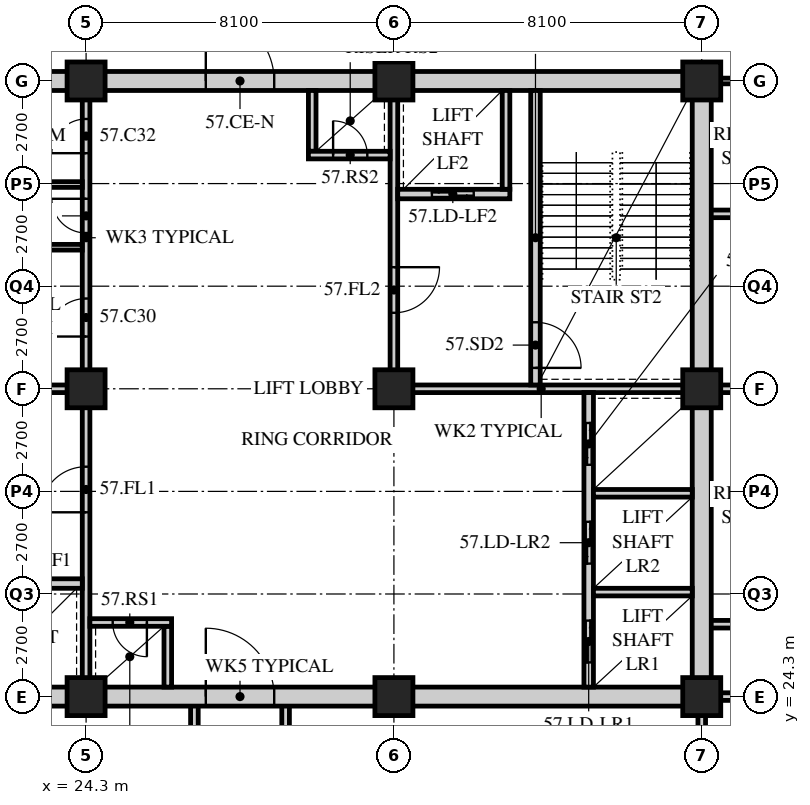
"""IFC4 building model, lengths in metres.
Left out: names, types, materials, properties, quantities, classifications, styles, units other than length and angle.
Written with IfcOpenShell. Run it as: python <this file> out.ifc"""

import sys

from ifc_helpers import new_model, si_unit, direction, frame, frame_2d, origin, origin_2d, place, context, subcontext, project, spatial, rectangle, hollow_rectangle, extrude, element, fill, save


model = new_model("IFC4")
c1 = context("Model", 3, precision=1e-05, world=origin(), true_north=direction((0.0, 1.0)))
c2 = subcontext(c1, "Body", "Model", "MODEL_VIEW")
j1 = project(units=[si_unit("LENGTHUNIT", "METRE"), si_unit("PLANEANGLEUNIT", "RADIAN")], contexts=[c1])
p1 = place(None, origin())
s1 = spatial("IfcSite", under=j1, at=p1, CompositionType="ELEMENT")
p2 = place(p1, origin())
s2 = spatial("IfcBuilding", under=s1, at=p2, CompositionType="ELEMENT")
p3 = place(p2, frame((0.0, 0.0, 220.8)))
s3 = spatial("IfcBuildingStorey", under=s2, at=p3, CompositionType="ELEMENT", Elevation=220.8)
for number, where, z_axis, x_axis in (
    (1, (24.3, 24.3, 0.0), (0.0, 0.0, 1.0), (1.0, 0.0, 0.0)),
    (2, (24.3, 32.4, 0.0), (0.0, 0.0, 1.0), (1.0, 0.0, 0.0)),
    (3, (24.3, 40.5, 0.0), (0.0, 0.0, 1.0), (1.0, 0.0, 0.0)),
    (4, (32.4, 24.3, 0.0), (0.0, 0.0, 1.0), (1.0, 0.0, 0.0)),
    (5, (32.4, 32.4, 0.0), (0.0, 0.0, 1.0), (1.0, 0.0, 0.0)),
    (6, (32.4, 40.5, 0.0), (0.0, 0.0, 1.0), (1.0, 0.0, 0.0)),
    (7, (40.5, 24.3, 0.0), (0.0, 0.0, 1.0), (1.0, 0.0, 0.0)),
    (8, (40.5, 32.4, 0.0), (0.0, 0.0, 1.0), (1.0, 0.0, 0.0)),
    (9, (40.5, 40.5, 0.0), (0.0, 0.0, 1.0), (1.0, 0.0, 0.0)),
):
    element("IfcColumn", number, at=place(p3, frame(where, z_axis=z_axis, x_axis=x_axis)), inside=s3, PredefinedType="COLUMN", context=c2, shape_type="SweptSolid", body=[
        extrude(hollow_rectangle(XDim=1.0, YDim=1.0, WallThickness=0.1, at=origin_2d()), origin(), (0.0, 0.0, 1.0), 3.6),
    ])
p4 = place(p3, frame((46.8, 40.5, 0.0), z_axis=(0.0, 0.0, 1.0), x_axis=(-1.0, 0.0, 0.0)))
e10 = element("IfcWall", 10, at=p4, inside=s3, PredefinedType="PARTITIONING", context=c2, shape_type="SweptSolid", body=[
    extrude(rectangle(XDim=6.1, YDim=0.15, at=frame_2d((3.05, 0.0))), origin(), (0.0, 0.0, 1.0), 3.39),
])
for number, where, z_axis, x_axis in (
    (11, (40.5, 32.4, 0.0), (0.0, 0.0, 1.0), (1.0, 0.0, 0.0)),
    (12, (46.8, 26.205, 0.0), (0.0, 0.0, 1.0), (-1.0, 0.0, 0.0)),
    (13, (46.8, 37.003, 0.0), (0.0, 0.0, 1.0), (-1.0, 0.0, 0.0)),
):
    element("IfcWall", number, at=place(p3, frame(where, z_axis=z_axis, x_axis=x_axis)), inside=s3, PredefinedType="SOLIDWALL", context=c2, shape_type="SweptSolid", body=[
        extrude(rectangle(XDim=6.3, YDim=0.2, at=frame_2d((3.15, 0.0))), origin(), (0.0, 0.0, 1.0), 3.39),
    ])
p5 = place(p3, frame((40.5, 20.7, 0.0), z_axis=(0.0, 0.0, 1.0), x_axis=(0.0, 1.0, 0.0)))
e14 = element("IfcWall", 14, at=p5, inside=s3, PredefinedType="SOLIDWALL", context=c2, shape_type="SweptSolid", body=[
    extrude(rectangle(XDim=3.6, YDim=0.2, at=frame_2d((1.8, 0.0))), origin(), (0.0, 0.0, 1.0), 2.628),
])
for number, where, z_axis, x_axis in (
    (15, (27.15, 20.7, 0.0), (0.0, 0.0, 1.0), (0.0, 1.0, 0.0)),
    (16, (29.55, 20.7, 0.0), (0.0, 0.0, 1.0), (0.0, 1.0, 0.0)),
):
    element("IfcWall", number, at=place(p3, frame(where, z_axis=z_axis, x_axis=x_axis)), inside=s3, PredefinedType="SOLIDWALL", context=c2, shape_type="SweptSolid", body=[
        extrude(rectangle(XDim=3.6, YDim=0.2, at=frame_2d((1.8, 0.0))), origin(), (0.0, 0.0, 1.0), 3.39),
    ])
p6 = place(p3, frame((40.5, 24.3, 0.0), z_axis=(0.0, 0.0, 1.0), x_axis=(1.0, 0.0, 0.0)))
e17 = element("IfcWall", 17, at=p6, inside=s3, PredefinedType="SOLIDWALL", context=c2, shape_type="SweptSolid", body=[
    extrude(rectangle(XDim=6.3, YDim=0.2, at=frame_2d((3.15, 0.0))), origin(), (0.0, 0.0, 1.0), 3.39),
])
p7 = place(p3, frame((15.95, 24.3, 0.0), z_axis=(0.0, 0.0, 1.0), x_axis=(1.0, 0.0, 0.0)))
e18 = element("IfcWall", 18, at=p7, inside=s3, PredefinedType="SOLIDWALL", context=c2, shape_type="SweptSolid", body=[
    extrude(rectangle(XDim=24.8, YDim=0.5, at=frame_2d((12.4, 0.0))), origin(), (0.0, 0.0, 1.0), 2.628),
])
p8 = place(p7, frame((11.5, 0.0, 0.0)))
e19 = element("IfcOpeningElement", 19, at=p8, cuts=e18, PredefinedType="OPENING", context=c2, shape_type="SweptSolid", body=[
    extrude(rectangle(XDim=1.8, YDim=2.4, at=frame_2d((0.9, 1.2))), frame((0.0, 0.26, 0.0), z_axis=(0.0, -1.0, 0.0), x_axis=(1.0, 0.0, 0.0)), (0.0, 0.0, 1.0), 0.52),
])
p9 = place(p3, frame((15.95, 40.5, 0.0), z_axis=(0.0, 0.0, 1.0), x_axis=(1.0, 0.0, 0.0)))
e20 = element("IfcWall", 20, at=p9, inside=s3, PredefinedType="SOLIDWALL", context=c2, shape_type="SweptSolid", body=[
    extrude(rectangle(XDim=24.8, YDim=0.5, at=frame_2d((12.4, 0.0))), origin(), (0.0, 0.0, 1.0), 2.628),
])
p10 = place(p9, frame((11.5, 0.0, 0.0)))
e21 = element("IfcOpeningElement", 21, at=p10, cuts=e20, PredefinedType="OPENING", context=c2, shape_type="SweptSolid", body=[
    extrude(rectangle(XDim=1.8, YDim=2.4, at=frame_2d((0.9, 1.2))), frame((0.0, 0.26, 0.0), z_axis=(0.0, -1.0, 0.0), x_axis=(1.0, 0.0, 0.0)), (0.0, 0.0, 1.0), 0.52),
])
p11 = place(p3, frame((40.5, 24.55, 0.0), z_axis=(0.0, 0.0, 1.0), x_axis=(0.0, 1.0, 0.0)))
e22 = element("IfcWall", 22, at=p11, inside=s3, PredefinedType="SOLIDWALL", context=c2, shape_type="SweptSolid", body=[
    extrude(rectangle(XDim=15.7, YDim=0.5, at=frame_2d((7.85, 0.0))), origin(), (0.0, 0.0, 1.0), 2.628),
])
p12 = place(p3, frame((16.45, 32.4, 0.0), z_axis=(0.0, 0.0, 1.0), x_axis=(1.0, 0.0, 0.0)))
e23 = element("IfcWall", 23, at=p12, inside=s3, PredefinedType="SOLIDWALL", context=c2, shape_type="SweptSolid", body=[
    extrude(rectangle(XDim=7.95, YDim=0.2, at=frame_2d((3.975, 0.0))), origin(), (0.0, 0.0, 1.0), 2.778),
])
p13 = place(p3, frame((24.3, 24.55, 0.0), z_axis=(0.0, 0.0, 1.0), x_axis=(0.0, 1.0, 0.0)))
e24 = element("IfcWall", 24, at=p13, inside=s3, PredefinedType="SOLIDWALL", context=c2, shape_type="SweptSolid", body=[
    extrude(rectangle(XDim=7.75, YDim=0.2, at=frame_2d((3.875, 0.0))), origin(), (0.0, 0.0, 1.0), 2.778),
])
p14 = place(p13, frame((4.6, 0.0, 0.0)))
e25 = element("IfcOpeningElement", 25, at=p14, cuts=e24, PredefinedType="OPENING", context=c2, shape_type="SweptSolid", body=[
    extrude(rectangle(XDim=1.2, YDim=2.1, at=frame_2d((0.6, 1.05))), frame((0.0, 0.11, 0.0), z_axis=(0.0, -1.0, 0.0), x_axis=(1.0, 0.0, 0.0)), (0.0, 0.0, 1.0), 0.22),
])
p15 = place(p3, frame((21.25, 27.275, 0.0), z_axis=(0.0, 0.0, 1.0), x_axis=(1.0, 0.0, 0.0)))
e26 = element("IfcWall", 26, at=p15, inside=s3, PredefinedType="SOLIDWALL", context=c2, shape_type="SweptSolid", body=[
    extrude(rectangle(XDim=2.95, YDim=0.25, at=frame_2d((1.475, 0.0))), origin(), (0.0, 0.0, 1.0), 3.39),
])
p16 = place(p15, frame((0.95, 0.0, 0.0)))
e27 = element("IfcOpeningElement", 27, at=p16, cuts=e26, PredefinedType="OPENING", context=c2, shape_type="SweptSolid", body=[
    extrude(rectangle(XDim=1.1, YDim=2.4, at=frame_2d((0.55, 1.2))), frame((0.0, 0.135, 0.0), z_axis=(0.0, -1.0, 0.0), x_axis=(1.0, 0.0, 0.0)), (0.0, 0.0, 1.0), 0.27),
])
p17 = place(p3, frame((26.45, 24.55, 0.0), z_axis=(0.0, 0.0, 1.0), x_axis=(0.0, 1.0, 0.0)))
e28 = element("IfcWall", 28, at=p17, inside=s3, PredefinedType="SOLIDWALL", context=c2, shape_type="SweptSolid", body=[
    extrude(rectangle(XDim=1.6, YDim=0.2, at=frame_2d((0.8, 0.0))), origin(), (0.0, 0.0, 1.0), 3.39),
])
p18 = place(p3, frame((24.4, 26.25, 0.0), z_axis=(0.0, 0.0, 1.0), x_axis=(1.0, 0.0, 0.0)))
e29 = element("IfcWall", 29, at=p18, inside=s3, PredefinedType="SOLIDWALL", context=c2, shape_type="SweptSolid", body=[
    extrude(rectangle(XDim=2.15, YDim=0.2, at=frame_2d((1.075, 0.0))), origin(), (0.0, 0.0, 1.0), 3.39),
])
p19 = place(p18, frame((0.6, 0.0, 0.0)))
e30 = element("IfcOpeningElement", 30, at=p19, cuts=e29, PredefinedType="OPENING", context=c2, shape_type="SweptSolid", body=[
    extrude(rectangle(XDim=0.9, YDim=2.1, at=frame_2d((0.45, 1.05))), frame((0.0, 0.11, 0.0), z_axis=(0.0, -1.0, 0.0), x_axis=(1.0, 0.0, 0.0)), (0.0, 0.0, 1.0), 0.22),
])
p20 = place(p3, frame((32.3, 32.4, 0.0), z_axis=(0.0, 0.0, 1.0), x_axis=(1.0, 0.0, 0.0)))
e31 = element("IfcWall", 31, at=p20, inside=s3, PredefinedType="SOLIDWALL", context=c2, shape_type="SweptSolid", body=[
    extrude(rectangle(XDim=7.95, YDim=0.2, at=frame_2d((3.975, 0.0))), origin(), (0.0, 0.0, 1.0), 2.778),
])
p21 = place(p3, frame((32.4, 32.5, 0.0), z_axis=(0.0, 0.0, 1.0), x_axis=(0.0, 1.0, 0.0)))
e32 = element("IfcWall", 32, at=p21, inside=s3, PredefinedType="SOLIDWALL", context=c2, shape_type="SweptSolid", body=[
    extrude(rectangle(XDim=7.75, YDim=0.2, at=frame_2d((3.875, 0.0))), origin(), (0.0, 0.0, 1.0), 2.778),
])
p22 = place(p21, frame((1.9, 0.0, 0.0)))
e33 = element("IfcOpeningElement", 33, at=p22, cuts=e32, PredefinedType="OPENING", context=c2, shape_type="SweptSolid", body=[
    extrude(rectangle(XDim=1.2, YDim=2.1, at=frame_2d((0.6, 1.05))), frame((0.0, 0.11, 0.0), z_axis=(0.0, -1.0, 0.0), x_axis=(1.0, 0.0, 0.0)), (0.0, 0.0, 1.0), 0.22),
])
p23 = place(p3, frame((37.525, 24.55, 0.0), z_axis=(0.0, 0.0, 1.0), x_axis=(0.0, 1.0, 0.0)))
e34 = element("IfcWall", 34, at=p23, inside=s3, PredefinedType="SOLIDWALL", context=c2, shape_type="SweptSolid", body=[
    extrude(rectangle(XDim=7.75, YDim=0.25, at=frame_2d((3.875, 0.0))), origin(), (0.0, 0.0, 1.0), 3.39),
])
p24 = place(p23, frame((0.65, 0.0, 0.0)))
e35 = element("IfcOpeningElement", 35, at=p24, cuts=e34, PredefinedType="OPENING", context=c2, shape_type="SweptSolid", body=[
    extrude(rectangle(XDim=1.1, YDim=2.4, at=frame_2d((0.55, 1.2))), frame((0.0, 0.135, 0.0), z_axis=(0.0, -1.0, 0.0), x_axis=(1.0, 0.0, 0.0)), (0.0, 0.0, 1.0), 0.27),
])
p25 = place(p23, frame((3.25, 0.0, 0.0)))
e36 = element("IfcOpeningElement", 36, at=p25, cuts=e34, PredefinedType="OPENING", context=c2, shape_type="SweptSolid", body=[
    extrude(rectangle(XDim=1.1, YDim=2.4, at=frame_2d((0.55, 1.2))), frame((0.0, 0.135, 0.0), z_axis=(0.0, -1.0, 0.0), x_axis=(1.0, 0.0, 0.0)), (0.0, 0.0, 1.0), 0.27),
])
p26 = place(p23, frame((5.85, 0.0, 0.0)))
e37 = element("IfcOpeningElement", 37, at=p26, cuts=e34, PredefinedType="OPENING", context=c2, shape_type="SweptSolid", body=[
    extrude(rectangle(XDim=1.1, YDim=2.4, at=frame_2d((0.55, 1.2))), frame((0.0, 0.135, 0.0), z_axis=(0.0, -1.0, 0.0), x_axis=(1.0, 0.0, 0.0)), (0.0, 0.0, 1.0), 0.27),
])
for number, where, z_axis, x_axis in (
    (38, (37.65, 27.05, 0.0), (0.0, 0.0, 1.0), (1.0, 0.0, 0.0)),
    (39, (37.65, 29.65, 0.0), (0.0, 0.0, 1.0), (1.0, 0.0, 0.0)),
):
    element("IfcWall", number, at=place(p3, frame(where, z_axis=z_axis, x_axis=x_axis)), inside=s3, PredefinedType="SOLIDWALL", context=c2, shape_type="SweptSolid", body=[
        extrude(rectangle(XDim=2.6, YDim=0.2, at=frame_2d((1.3, 0.0))), origin(), (0.0, 0.0, 1.0), 3.39),
    ])
p27 = place(p3, frame((36.125, 32.5, 0.0), z_axis=(0.0, 0.0, 1.0), x_axis=(0.0, 1.0, 0.0)))
e40 = element("IfcWall", 40, at=p27, inside=s3, PredefinedType="SOLIDWALL", context=c2, shape_type="SweptSolid", body=[
    extrude(rectangle(XDim=7.75, YDim=0.25, at=frame_2d((3.875, 0.0))), origin(), (0.0, 0.0, 1.0), 3.39),
])
p28 = place(p27, frame((0.45, 0.0, 0.0)))
e41 = element("IfcOpeningElement", 41, at=p28, cuts=e40, PredefinedType="OPENING", context=c2, shape_type="SweptSolid", body=[
    extrude(rectangle(XDim=1.2, YDim=2.1, at=frame_2d((0.6, 1.05))), frame((0.0, 0.135, 0.0), z_axis=(0.0, -1.0, 0.0), x_axis=(1.0, 0.0, 0.0)), (0.0, 0.0, 1.0), 0.27),
])
p29 = place(p3, frame((32.5, 37.525, 0.0), z_axis=(0.0, 0.0, 1.0), x_axis=(1.0, 0.0, 0.0)))
e42 = element("IfcWall", 42, at=p29, inside=s3, PredefinedType="SOLIDWALL", context=c2, shape_type="SweptSolid", body=[
    extrude(rectangle(XDim=2.95, YDim=0.25, at=frame_2d((1.475, 0.0))), origin(), (0.0, 0.0, 1.0), 3.39),
])
p30 = place(p29, frame((0.9, 0.0, 0.0)))
e43 = element("IfcOpeningElement", 43, at=p30, cuts=e42, PredefinedType="OPENING", context=c2, shape_type="SweptSolid", body=[
    extrude(rectangle(XDim=1.1, YDim=2.4, at=frame_2d((0.55, 1.2))), frame((0.0, 0.135, 0.0), z_axis=(0.0, -1.0, 0.0), x_axis=(1.0, 0.0, 0.0)), (0.0, 0.0, 1.0), 0.27),
])
p31 = place(p3, frame((35.35, 37.65, 0.0), z_axis=(0.0, 0.0, 1.0), x_axis=(0.0, 1.0, 0.0)))
e44 = element("IfcWall", 44, at=p31, inside=s3, PredefinedType="SOLIDWALL", context=c2, shape_type="SweptSolid", body=[
    extrude(rectangle(XDim=2.6, YDim=0.2, at=frame_2d((1.3, 0.0))), origin(), (0.0, 0.0, 1.0), 3.39),
])
p32 = place(p3, frame((30.25, 38.65, 0.0), z_axis=(0.0, 0.0, 1.0), x_axis=(0.0, 1.0, 0.0)))
e45 = element("IfcWall", 45, at=p32, inside=s3, PredefinedType="SOLIDWALL", context=c2, shape_type="SweptSolid", body=[
    extrude(rectangle(XDim=1.6, YDim=0.2, at=frame_2d((0.8, 0.0))), origin(), (0.0, 0.0, 1.0), 3.39),
])
p33 = place(p3, frame((30.15, 38.55, 0.0), z_axis=(0.0, 0.0, 1.0), x_axis=(1.0, 0.0, 0.0)))
e46 = element("IfcWall", 46, at=p33, inside=s3, PredefinedType="SOLIDWALL", context=c2, shape_type="SweptSolid", body=[
    extrude(rectangle(XDim=2.15, YDim=0.2, at=frame_2d((1.075, 0.0))), origin(), (0.0, 0.0, 1.0), 3.39),
])
p34 = place(p33, frame((0.65, 0.0, 0.0)))
e47 = element("IfcOpeningElement", 47, at=p34, cuts=e46, PredefinedType="OPENING", context=c2, shape_type="SweptSolid", body=[
    extrude(rectangle(XDim=0.9, YDim=2.1, at=frame_2d((0.45, 1.05))), frame((0.0, 0.11, 0.0), z_axis=(0.0, -1.0, 0.0), x_axis=(1.0, 0.0, 0.0)), (0.0, 0.0, 1.0), 0.22),
])
p35 = place(p3, frame((24.3, 32.5, 0.0), z_axis=(0.0, 0.0, 1.0), x_axis=(0.0, 1.0, 0.0)))
e48 = element("IfcWall", 48, at=p35, inside=s3, PredefinedType="PARTITIONING", context=c2, shape_type="SweptSolid", body=[
    extrude(rectangle(XDim=7.75, YDim=0.2, at=frame_2d((3.875, 0.0))), origin(), (0.0, 0.0, 1.0), 2.778),
])
p36 = place(p35, frame((1.275, 0.0, 0.0)))
e49 = element("IfcOpeningElement", 49, at=p36, cuts=e48, PredefinedType="OPENING", context=c2, shape_type="SweptSolid", body=[
    extrude(rectangle(XDim=1.0, YDim=2.1, at=frame_2d((0.5, 1.05))), frame((0.0, 0.11, 0.0), z_axis=(0.0, -1.0, 0.0), x_axis=(1.0, 0.0, 0.0)), (0.0, 0.0, 1.0), 0.22),
])
p37 = place(p35, frame((4.0, 0.0, 0.0)))
e50 = element("IfcOpeningElement", 50, at=p37, cuts=e48, PredefinedType="OPENING", context=c2, shape_type="SweptSolid", body=[
    extrude(rectangle(XDim=0.9, YDim=2.1, at=frame_2d((0.45, 1.05))), frame((0.0, 0.11, 0.0), z_axis=(0.0, -1.0, 0.0), x_axis=(1.0, 0.0, 0.0)), (0.0, 0.0, 1.0), 0.22),
])
p38 = place(p35, frame((6.1, 0.0, 0.0)))
e51 = element("IfcOpeningElement", 51, at=p38, cuts=e48, PredefinedType="OPENING", context=c2, shape_type="SweptSolid", body=[
    extrude(rectangle(XDim=0.9, YDim=2.1, at=frame_2d((0.45, 1.05))), frame((0.0, 0.11, 0.0), z_axis=(0.0, -1.0, 0.0), x_axis=(1.0, 0.0, 0.0)), (0.0, 0.0, 1.0), 0.22),
])
for number, where, z_axis, x_axis in (
    (52, (21.05, 36.125, 0.0), (0.0, 0.0, 1.0), (1.0, 0.0, 0.0)),
    (53, (21.05, 37.775, 0.0), (0.0, 0.0, 1.0), (1.0, 0.0, 0.0)),
):
    element("IfcWall", number, at=place(p3, frame(where, z_axis=z_axis, x_axis=x_axis)), inside=s3, PredefinedType="PARTITIONING", context=c2, shape_type="SweptSolid", body=[
        extrude(rectangle(XDim=3.15, YDim=0.15, at=frame_2d((1.575, 0.0))), origin(), (0.0, 0.0, 1.0), 3.39),
    ])
p39 = place(p36, origin())
e54 = element("IfcDoor", 54, at=p39, inside=s3, OperationType="SINGLE_SWING_LEFT", PredefinedType="DOOR", context=c2, shape_type="SweptSolid", body=[
    extrude(rectangle(XDim=1.0, YDim=2.1, at=frame_2d((0.5, 1.05))), frame((0.0, 0.025, 0.0), z_axis=(0.0, -1.0, 0.0), x_axis=(1.0, 0.0, 0.0)), (0.0, 0.0, 1.0), 0.05),
])
fill(e49, e54)
p40 = place(p37, origin())
e55 = element("IfcDoor", 55, at=p40, inside=s3, OperationType="SINGLE_SWING_RIGHT", PredefinedType="DOOR", context=c2, shape_type="SweptSolid", body=[
    extrude(rectangle(XDim=0.9, YDim=2.1, at=frame_2d((0.45, 1.05))), frame((0.0, 0.025, 0.0), z_axis=(0.0, -1.0, 0.0), x_axis=(1.0, 0.0, 0.0)), (0.0, 0.0, 1.0), 0.05),
])
fill(e50, e55)
p41 = place(p38, origin())
e56 = element("IfcDoor", 56, at=p41, inside=s3, OperationType="SINGLE_SWING_LEFT", PredefinedType="DOOR", context=c2, shape_type="SweptSolid", body=[
    extrude(rectangle(XDim=0.9, YDim=2.1, at=frame_2d((0.45, 1.05))), frame((0.0, 0.025, 0.0), z_axis=(0.0, -1.0, 0.0), x_axis=(1.0, 0.0, 0.0)), (0.0, 0.0, 1.0), 0.05),
])
fill(e51, e56)
p42 = place(p14, origin())
e57 = element("IfcDoor", 57, at=p42, inside=s3, OperationType="SINGLE_SWING_LEFT", PredefinedType="DOOR", context=c2, shape_type="SweptSolid", body=[
    extrude(rectangle(XDim=1.2, YDim=2.1, at=frame_2d((0.6, 1.05))), frame((0.0, 0.025, 0.0), z_axis=(0.0, -1.0, 0.0), x_axis=(1.0, 0.0, 0.0)), (0.0, 0.0, 1.0), 0.05),
])
fill(e25, e57)
p43 = place(p19, origin())
e58 = element("IfcDoor", 58, at=p43, inside=s3, OperationType="SINGLE_SWING_LEFT", PredefinedType="DOOR", context=c2, shape_type="SweptSolid", body=[
    extrude(rectangle(XDim=0.9, YDim=2.1, at=frame_2d((0.45, 1.05))), frame((0.0, 0.025, 0.0), z_axis=(0.0, -1.0, 0.0), x_axis=(1.0, 0.0, 0.0)), (0.0, 0.0, 1.0), 0.05),
])
fill(e30, e58)
p44 = place(p28, origin())
e59 = element("IfcDoor", 59, at=p44, inside=s3, OperationType="SINGLE_SWING_RIGHT", PredefinedType="DOOR", context=c2, shape_type="SweptSolid", body=[
    extrude(rectangle(XDim=1.2, YDim=2.1, at=frame_2d((0.6, 1.05))), frame((0.0, 0.025, 0.0), z_axis=(0.0, -1.0, 0.0), x_axis=(1.0, 0.0, 0.0)), (0.0, 0.0, 1.0), 0.05),
])
fill(e41, e59)
p45 = place(p22, origin())
e60 = element("IfcDoor", 60, at=p45, inside=s3, OperationType="SINGLE_SWING_LEFT", PredefinedType="DOOR", context=c2, shape_type="SweptSolid", body=[
    extrude(rectangle(XDim=1.2, YDim=2.1, at=frame_2d((0.6, 1.05))), frame((0.0, 0.025, 0.0), z_axis=(0.0, -1.0, 0.0), x_axis=(1.0, 0.0, 0.0)), (0.0, 0.0, 1.0), 0.05),
])
fill(e33, e60)
p46 = place(p34, origin())
e61 = element("IfcDoor", 61, at=p46, inside=s3, OperationType="SINGLE_SWING_LEFT", PredefinedType="DOOR", context=c2, shape_type="SweptSolid", body=[
    extrude(rectangle(XDim=0.9, YDim=2.1, at=frame_2d((0.45, 1.05))), frame((0.0, 0.025, 0.0), z_axis=(0.0, -1.0, 0.0), x_axis=(1.0, 0.0, 0.0)), (0.0, 0.0, 1.0), 0.05),
])
fill(e47, e61)
p47 = place(p24, origin())
e62 = element("IfcDoor", 62, at=p47, inside=s3, OperationType="DOUBLE_DOOR_SLIDING", PredefinedType="DOOR", context=c2, shape_type="SweptSolid", body=[
    extrude(rectangle(XDim=1.1, YDim=2.4, at=frame_2d((0.55, 1.2))), frame((0.0, 0.025, 0.0), z_axis=(0.0, -1.0, 0.0), x_axis=(1.0, 0.0, 0.0)), (0.0, 0.0, 1.0), 0.05),
])
fill(e35, e62)
p48 = place(p25, origin())
e63 = element("IfcDoor", 63, at=p48, inside=s3, OperationType="DOUBLE_DOOR_SLIDING", PredefinedType="DOOR", context=c2, shape_type="SweptSolid", body=[
    extrude(rectangle(XDim=1.1, YDim=2.4, at=frame_2d((0.55, 1.2))), frame((0.0, 0.025, 0.0), z_axis=(0.0, -1.0, 0.0), x_axis=(1.0, 0.0, 0.0)), (0.0, 0.0, 1.0), 0.05),
])
fill(e36, e63)
p49 = place(p26, origin())
e64 = element("IfcDoor", 64, at=p49, inside=s3, OperationType="DOUBLE_DOOR_SLIDING", PredefinedType="DOOR", context=c2, shape_type="SweptSolid", body=[
    extrude(rectangle(XDim=1.1, YDim=2.4, at=frame_2d((0.55, 1.2))), frame((0.0, 0.025, 0.0), z_axis=(0.0, -1.0, 0.0), x_axis=(1.0, 0.0, 0.0)), (0.0, 0.0, 1.0), 0.05),
])
fill(e37, e64)
p50 = place(p30, origin())
e65 = element("IfcDoor", 65, at=p50, inside=s3, OperationType="DOUBLE_DOOR_SLIDING", PredefinedType="DOOR", context=c2, shape_type="SweptSolid", body=[
    extrude(rectangle(XDim=1.1, YDim=2.4, at=frame_2d((0.55, 1.2))), frame((0.0, 0.025, 0.0), z_axis=(0.0, -1.0, 0.0), x_axis=(1.0, 0.0, 0.0)), (0.0, 0.0, 1.0), 0.05),
])
fill(e43, e65)
p51 = place(p8, origin())
e66 = element("IfcDoor", 66, at=p51, inside=s3, OperationType="DOUBLE_DOOR_SINGLE_SWING", PredefinedType="DOOR", context=c2, shape_type="SweptSolid", body=[
    extrude(rectangle(XDim=1.8, YDim=2.4, at=frame_2d((0.9, 1.2))), frame((0.0, 0.025, 0.0), z_axis=(0.0, -1.0, 0.0), x_axis=(1.0, 0.0, 0.0)), (0.0, 0.0, 1.0), 0.05),
])
fill(e19, e66)
p52 = place(p10, origin())
e67 = element("IfcDoor", 67, at=p52, inside=s3, OperationType="DOUBLE_DOOR_SINGLE_SWING", PredefinedType="DOOR", context=c2, shape_type="SweptSolid", body=[
    extrude(rectangle(XDim=1.8, YDim=2.4, at=frame_2d((0.9, 1.2))), frame((0.0, 0.025, 0.0), z_axis=(0.0, -1.0, 0.0), x_axis=(1.0, 0.0, 0.0)), (0.0, 0.0, 1.0), 0.05),
])
fill(e21, e67)
save(model, sys.argv[1])
